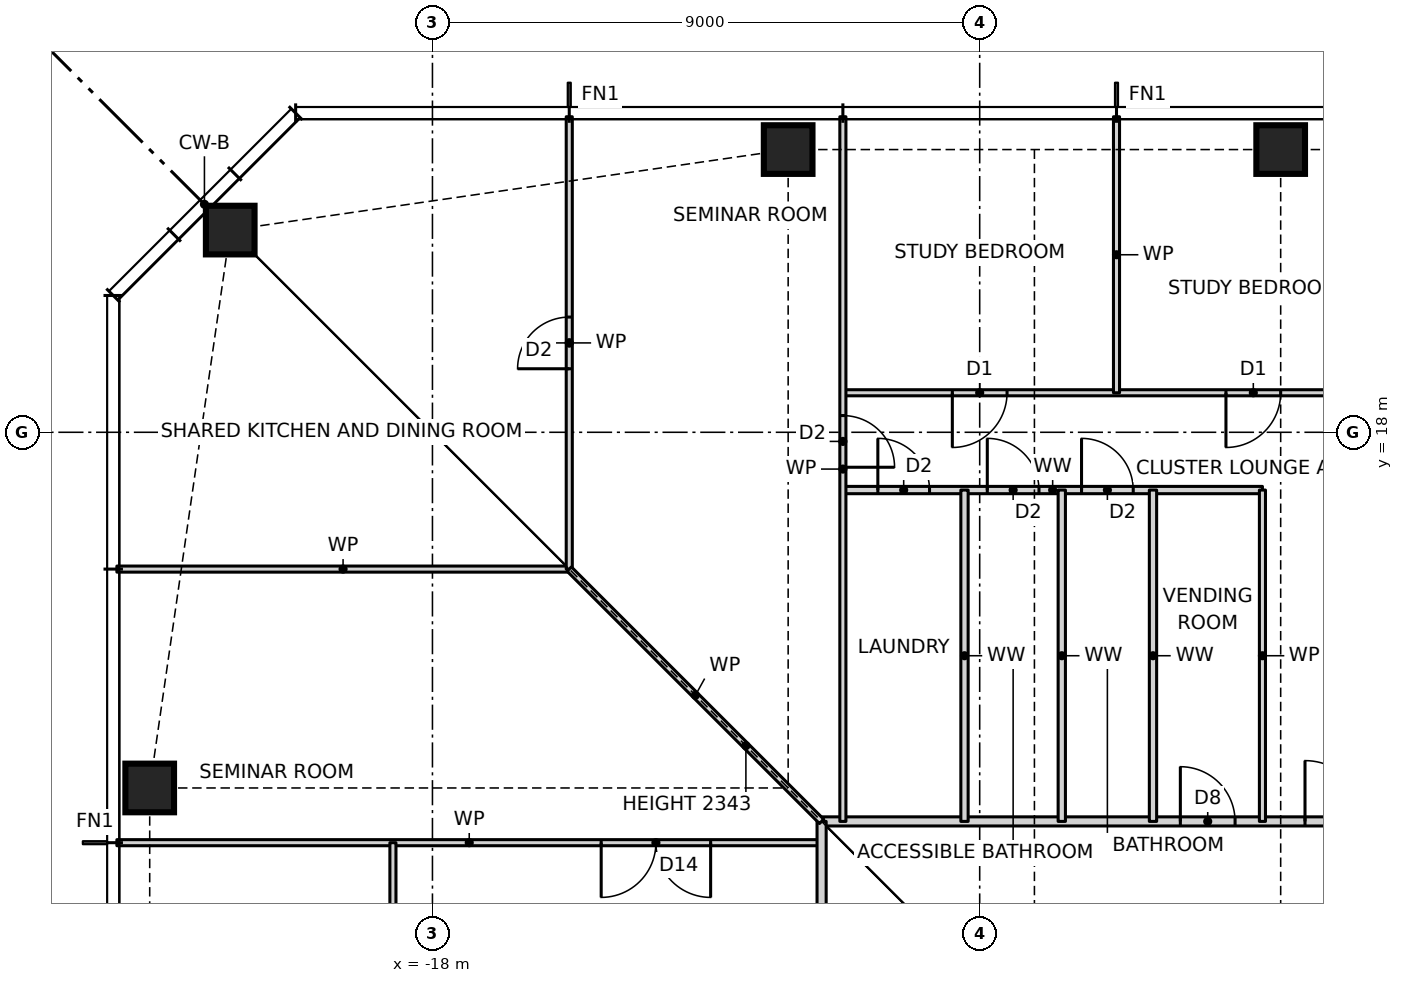
"""IFC4 building model, lengths in metres.
Left out: names, types, materials, properties, quantities, classifications, styles, units other than length and angle.
Written with IfcOpenShell. Run it as: python <this file> out.ifc"""

import sys

from ifc_helpers import new_model, si_unit, direction, frame, frame_2d, origin, origin_2d, place, context, subcontext, project, spatial, rectangle, hollow_rectangle, extrude, element, fill, save


model = new_model("IFC4")
c1 = context("Model", 3, precision=1e-05, world=origin(), true_north=direction((0.0, 1.0)))
c2 = subcontext(c1, "Body", "Model", "MODEL_VIEW")
j1 = project(units=[si_unit("LENGTHUNIT", "METRE"), si_unit("PLANEANGLEUNIT", "RADIAN")], contexts=[c1])
p1 = place(None, origin())
s1 = spatial("IfcSite", under=j1, at=p1, CompositionType="ELEMENT")
p2 = place(p1, origin())
s2 = spatial("IfcBuilding", under=s1, at=p2, CompositionType="ELEMENT")
p3 = place(p2, frame((0.0, 0.0, 67.5)))
s3 = spatial("IfcBuildingStorey", under=s2, at=p3, CompositionType="ELEMENT", Elevation=67.5)
for number, where, z_axis, x_axis in (
    (1, (-4.05, 22.65, 0.0), (0.0, 0.0, 1.0), (1.0, 0.0, 0.0)),
    (2, (-12.15, 22.65, 0.0), (0.0, 0.0, 1.0), (1.0, 0.0, 0.0)),
    (3, (-21.326, 21.326, 0.0), (0.0, 0.0, 1.0), (1.0, 0.0, 0.0)),
    (4, (-22.65, 12.15, 0.0), (0.0, 0.0, 1.0), (1.0, 0.0, 0.0)),
):
    element("IfcColumn", number, at=place(p3, frame(where, z_axis=z_axis, x_axis=x_axis)), inside=s3, PredefinedType="COLUMN", context=c2, shape_type="SweptSolid", body=[
        extrude(hollow_rectangle(XDim=0.8, YDim=0.8, WallThickness=0.09, at=origin_2d()), origin(), (0.0, 0.0, 1.0), 3.5),
    ])
p4 = place(p3, frame((-23.19, 11.25, 0.0), z_axis=(0.0, 0.0, 1.0), x_axis=(1.0, 0.0, 0.0)))
e5 = element("IfcWall", 5, at=p4, inside=s3, PredefinedType="PARTITIONING", context=c2, shape_type="SweptSolid", body=[
    extrude(rectangle(XDim=11.59, YDim=0.1, at=frame_2d((5.795, 0.0))), origin(), (0.0, 0.0, 1.0), 3.27),
])
p5 = place(p4, frame((7.965, 0.0, 0.0)))
e6 = element("IfcOpeningElement", 6, at=p5, cuts=e5, PredefinedType="OPENING", context=c2, shape_type="SweptSolid", body=[
    extrude(rectangle(XDim=1.8, YDim=2.1, at=frame_2d((0.9, 1.05))), frame((0.0, 0.06, 0.0), z_axis=(0.0, -1.0, 0.0), x_axis=(1.0, 0.0, 0.0)), (0.0, 0.0, 1.0), 0.12),
])
p6 = place(p3, frame((-11.6, 11.6, 0.0), z_axis=(0.0, 0.0, 1.0), x_axis=(1.0, 0.0, 0.0)))
e7 = element("IfcWall", 7, at=p6, inside=s3, PredefinedType="PARTITIONING", context=c2, shape_type="SweptSolid", body=[
    extrude(rectangle(XDim=24.2, YDim=0.15, at=frame_2d((12.1, 0.0))), origin(), (0.0, 0.0, 1.0), 3.27),
])
p7 = place(p6, frame((7.95, 0.0, 0.0)))
e8 = element("IfcOpeningElement", 8, at=p7, cuts=e7, PredefinedType="OPENING", context=c2, shape_type="SweptSolid", body=[
    extrude(rectangle(XDim=1.0, YDim=2.1, at=frame_2d((0.5, 1.05))), frame((0.0, 0.085, 0.0), z_axis=(0.0, -1.0, 0.0), x_axis=(1.0, 0.0, 0.0)), (0.0, 0.0, 1.0), 0.17),
])
p8 = place(p6, frame((5.9, 0.0, 0.0)))
e9 = element("IfcOpeningElement", 9, at=p8, cuts=e7, PredefinedType="OPENING", context=c2, shape_type="SweptSolid", body=[
    extrude(rectangle(XDim=0.9, YDim=2.1, at=frame_2d((0.45, 1.05))), frame((0.0, 0.085, 0.0), z_axis=(0.0, -1.0, 0.0), x_axis=(1.0, 0.0, 0.0)), (0.0, 0.0, 1.0), 0.17),
])
p9 = place(p3, frame((-23.19, 15.75, 0.0), z_axis=(0.0, 0.0, 1.0), x_axis=(1.0, 0.0, 0.0)))
e10 = element("IfcWall", 10, at=p9, inside=s3, PredefinedType="PARTITIONING", context=c2, shape_type="SweptSolid", body=[
    extrude(rectangle(XDim=7.44, YDim=0.1, at=frame_2d((3.72, 0.0))), origin(), (0.0, 0.0, 1.0), 3.27),
])
p10 = place(p3, frame((-11.25, 17.05, 0.0), z_axis=(0.0, 0.0, 1.0), x_axis=(1.0, 0.0, 0.0)))
e11 = element("IfcWall", 11, at=p10, inside=s3, PredefinedType="PARTITIONING", context=c2, shape_type="SweptSolid", body=[
    extrude(rectangle(XDim=6.9, YDim=0.12, at=frame_2d((3.45, 0.0))), origin(), (0.0, 0.0, 1.0), 3.27),
])
p11 = place(p10, frame((3.925, 0.0, 0.0)))
e12 = element("IfcOpeningElement", 12, at=p11, cuts=e11, PredefinedType="OPENING", context=c2, shape_type="SweptSolid", body=[
    extrude(rectangle(XDim=0.85, YDim=2.1, at=frame_2d((0.425, 1.05))), frame((0.0, 0.07, 0.0), z_axis=(0.0, -1.0, 0.0), x_axis=(1.0, 0.0, 0.0)), (0.0, 0.0, 1.0), 0.14),
])
p12 = place(p10, frame((2.375, 0.0, 0.0)))
e13 = element("IfcOpeningElement", 13, at=p12, cuts=e11, PredefinedType="OPENING", context=c2, shape_type="SweptSolid", body=[
    extrude(rectangle(XDim=0.85, YDim=2.1, at=frame_2d((0.425, 1.05))), frame((0.0, 0.07, 0.0), z_axis=(0.0, -1.0, 0.0), x_axis=(1.0, 0.0, 0.0)), (0.0, 0.0, 1.0), 0.14),
])
p13 = place(p10, frame((0.575, 0.0, 0.0)))
e14 = element("IfcOpeningElement", 14, at=p13, cuts=e11, PredefinedType="OPENING", context=c2, shape_type="SweptSolid", body=[
    extrude(rectangle(XDim=0.85, YDim=2.1, at=frame_2d((0.425, 1.05))), frame((0.0, 0.07, 0.0), z_axis=(0.0, -1.0, 0.0), x_axis=(1.0, 0.0, 0.0)), (0.0, 0.0, 1.0), 0.14),
])
p14 = place(p3, frame((-11.25, 18.65, 0.0), z_axis=(0.0, 0.0, 1.0), x_axis=(1.0, 0.0, 0.0)))
e15 = element("IfcWall", 15, at=p14, inside=s3, PredefinedType="PARTITIONING", context=c2, shape_type="SweptSolid", body=[
    extrude(rectangle(XDim=27.0, YDim=0.1, at=frame_2d((13.5, 0.0))), origin(), (0.0, 0.0, 1.0), 3.27),
])
p15 = place(p14, frame((24.3, 0.0, 0.0)))
e16 = element("IfcOpeningElement", 16, at=p15, cuts=e15, PredefinedType="OPENING", context=c2, shape_type="SweptSolid", body=[
    extrude(rectangle(XDim=0.9, YDim=2.1, at=frame_2d((0.45, 1.05))), frame((0.0, 0.06, 0.0), z_axis=(0.0, -1.0, 0.0), x_axis=(1.0, 0.0, 0.0)), (0.0, 0.0, 1.0), 0.12),
])
p16 = place(p14, frame((19.8, 0.0, 0.0)))
e17 = element("IfcOpeningElement", 17, at=p16, cuts=e15, PredefinedType="OPENING", context=c2, shape_type="SweptSolid", body=[
    extrude(rectangle(XDim=0.9, YDim=2.1, at=frame_2d((0.45, 1.05))), frame((0.0, 0.06, 0.0), z_axis=(0.0, -1.0, 0.0), x_axis=(1.0, 0.0, 0.0)), (0.0, 0.0, 1.0), 0.12),
])
p17 = place(p14, frame((15.3, 0.0, 0.0)))
e18 = element("IfcOpeningElement", 18, at=p17, cuts=e15, PredefinedType="OPENING", context=c2, shape_type="SweptSolid", body=[
    extrude(rectangle(XDim=0.9, YDim=2.1, at=frame_2d((0.45, 1.05))), frame((0.0, 0.06, 0.0), z_axis=(0.0, -1.0, 0.0), x_axis=(1.0, 0.0, 0.0)), (0.0, 0.0, 1.0), 0.12),
])
p18 = place(p14, frame((10.8, 0.0, 0.0)))
e19 = element("IfcOpeningElement", 19, at=p18, cuts=e15, PredefinedType="OPENING", context=c2, shape_type="SweptSolid", body=[
    extrude(rectangle(XDim=0.9, YDim=2.1, at=frame_2d((0.45, 1.05))), frame((0.0, 0.06, 0.0), z_axis=(0.0, -1.0, 0.0), x_axis=(1.0, 0.0, 0.0)), (0.0, 0.0, 1.0), 0.12),
])
p19 = place(p14, frame((6.3, 0.0, 0.0)))
e20 = element("IfcOpeningElement", 20, at=p19, cuts=e15, PredefinedType="OPENING", context=c2, shape_type="SweptSolid", body=[
    extrude(rectangle(XDim=0.9, YDim=2.1, at=frame_2d((0.45, 1.05))), frame((0.0, 0.06, 0.0), z_axis=(0.0, -1.0, 0.0), x_axis=(1.0, 0.0, 0.0)), (0.0, 0.0, 1.0), 0.12),
])
p20 = place(p14, frame((1.8, 0.0, 0.0)))
e21 = element("IfcOpeningElement", 21, at=p20, cuts=e15, PredefinedType="OPENING", context=c2, shape_type="SweptSolid", body=[
    extrude(rectangle(XDim=0.9, YDim=2.1, at=frame_2d((0.45, 1.05))), frame((0.0, 0.06, 0.0), z_axis=(0.0, -1.0, 0.0), x_axis=(1.0, 0.0, 0.0)), (0.0, 0.0, 1.0), 0.12),
])
p21 = place(p3, frame((-4.35, 11.6, 0.0), z_axis=(0.0, 0.0, 1.0), x_axis=(0.0, 1.0, 0.0)))
e22 = element("IfcWall", 22, at=p21, inside=s3, PredefinedType="PARTITIONING", context=c2, shape_type="SweptSolid", body=[
    extrude(rectangle(XDim=5.45, YDim=0.1, at=frame_2d((2.725, 0.0))), origin(), (0.0, 0.0, 1.0), 3.27),
])
p22 = place(p3, frame((-6.15, 11.6, 0.0), z_axis=(0.0, 0.0, 1.0), x_axis=(0.0, 1.0, 0.0)))
e23 = element("IfcWall", 23, at=p22, inside=s3, PredefinedType="PARTITIONING", context=c2, shape_type="SweptSolid", body=[
    extrude(rectangle(XDim=5.45, YDim=0.12, at=frame_2d((2.725, 0.0))), origin(), (0.0, 0.0, 1.0), 3.27),
])
p23 = place(p3, frame((-6.75, 18.65, 0.0), z_axis=(0.0, 0.0, 1.0), x_axis=(0.0, 1.0, 0.0)))
e24 = element("IfcWall", 24, at=p23, inside=s3, PredefinedType="PARTITIONING", context=c2, shape_type="SweptSolid", body=[
    extrude(rectangle(XDim=4.54, YDim=0.1, at=frame_2d((2.27, 0.0))), origin(), (0.0, 0.0, 1.0), 3.27),
])
for number, where, z_axis, x_axis in (
    (25, (-7.65, 11.6, 0.0), (0.0, 0.0, 1.0), (0.0, 1.0, 0.0)),
    (26, (-9.25, 11.6, 0.0), (0.0, 0.0, 1.0), (0.0, 1.0, 0.0)),
):
    element("IfcWall", number, at=place(p3, frame(where, z_axis=z_axis, x_axis=x_axis)), inside=s3, PredefinedType="PARTITIONING", context=c2, shape_type="SweptSolid", body=[
        extrude(rectangle(XDim=5.45, YDim=0.12, at=frame_2d((2.725, 0.0))), origin(), (0.0, 0.0, 1.0), 3.27),
    ])
p24 = place(p3, frame((-11.25, 11.6, 0.0), z_axis=(0.0, 0.0, 1.0), x_axis=(0.0, 1.0, 0.0)))
e27 = element("IfcWall", 27, at=p24, inside=s3, PredefinedType="PARTITIONING", context=c2, shape_type="SweptSolid", body=[
    extrude(rectangle(XDim=11.59, YDim=0.1, at=frame_2d((5.795, 0.0))), origin(), (0.0, 0.0, 1.0), 3.27),
])
p25 = place(p24, frame((5.825, 0.0, 0.0)))
e28 = element("IfcOpeningElement", 28, at=p25, cuts=e27, PredefinedType="OPENING", context=c2, shape_type="SweptSolid", body=[
    extrude(rectangle(XDim=0.85, YDim=2.1, at=frame_2d((0.425, 1.05))), frame((0.0, 0.06, 0.0), z_axis=(0.0, -1.0, 0.0), x_axis=(1.0, 0.0, 0.0)), (0.0, 0.0, 1.0), 0.12),
])
p26 = place(p3, frame((-11.6, -11.6, 0.0), z_axis=(0.0, 0.0, 1.0), x_axis=(0.0, 1.0, 0.0)))
e29 = element("IfcWall", 29, at=p26, inside=s3, PredefinedType="PARTITIONING", context=c2, shape_type="SweptSolid", body=[
    extrude(rectangle(XDim=23.2, YDim=0.15, at=frame_2d((11.6, 0.0))), origin(), (0.0, 0.0, 1.0), 3.27),
])
p27 = place(p26, frame((18.6, 0.0, 0.0)))
e30 = element("IfcOpeningElement", 30, at=p27, cuts=e29, PredefinedType="OPENING", context=c2, shape_type="SweptSolid", body=[
    extrude(rectangle(XDim=1.0, YDim=2.1, at=frame_2d((0.5, 1.05))), frame((0.0, 0.085, 0.0), z_axis=(0.0, -1.0, 0.0), x_axis=(1.0, 0.0, 0.0)), (0.0, 0.0, 1.0), 0.17),
])
p28 = place(p26, frame((1.175, 0.0, 0.0)))
e31 = element("IfcOpeningElement", 31, at=p28, cuts=e29, PredefinedType="OPENING", context=c2, shape_type="SweptSolid", body=[
    extrude(rectangle(XDim=1.0, YDim=2.1, at=frame_2d((0.5, 1.05))), frame((0.0, 0.085, 0.0), z_axis=(0.0, -1.0, 0.0), x_axis=(1.0, 0.0, 0.0)), (0.0, 0.0, 1.0), 0.17),
])
p29 = place(p3, frame((-15.75, 15.75, 0.0), z_axis=(0.0, 0.0, 1.0), x_axis=(0.0, 1.0, 0.0)))
e32 = element("IfcWall", 32, at=p29, inside=s3, PredefinedType="PARTITIONING", context=c2, shape_type="SweptSolid", body=[
    extrude(rectangle(XDim=7.44, YDim=0.1, at=frame_2d((3.72, 0.0))), origin(), (0.0, 0.0, 1.0), 3.27),
])
p30 = place(p29, frame((3.295, 0.0, 0.0)))
e33 = element("IfcOpeningElement", 33, at=p30, cuts=e32, PredefinedType="OPENING", context=c2, shape_type="SweptSolid", body=[
    extrude(rectangle(XDim=0.85, YDim=2.1, at=frame_2d((0.425, 1.05))), frame((0.0, 0.06, 0.0), z_axis=(0.0, -1.0, 0.0), x_axis=(1.0, 0.0, 0.0)), (0.0, 0.0, 1.0), 0.12),
])
p31 = place(p3, frame((-18.65, -15.75, 0.0), z_axis=(0.0, 0.0, 1.0), x_axis=(0.0, 1.0, 0.0)))
e34 = element("IfcWall", 34, at=p31, inside=s3, PredefinedType="PARTITIONING", context=c2, shape_type="SweptSolid", body=[
    extrude(rectangle(XDim=27.0, YDim=0.1, at=frame_2d((13.5, 0.0))), origin(), (0.0, 0.0, 1.0), 3.0),
])
p32 = place(p31, frame((24.3, 0.0, 0.0)))
e35 = element("IfcOpeningElement", 35, at=p32, cuts=e34, PredefinedType="OPENING", context=c2, shape_type="SweptSolid", body=[
    extrude(rectangle(XDim=0.9, YDim=2.1, at=frame_2d((0.45, 1.05))), frame((0.0, 0.06, 0.0), z_axis=(0.0, -1.0, 0.0), x_axis=(1.0, 0.0, 0.0)), (0.0, 0.0, 1.0), 0.12),
])
p33 = place(p31, frame((19.8, 0.0, 0.0)))
e36 = element("IfcOpeningElement", 36, at=p33, cuts=e34, PredefinedType="OPENING", context=c2, shape_type="SweptSolid", body=[
    extrude(rectangle(XDim=0.9, YDim=2.1, at=frame_2d((0.45, 1.05))), frame((0.0, 0.06, 0.0), z_axis=(0.0, -1.0, 0.0), x_axis=(1.0, 0.0, 0.0)), (0.0, 0.0, 1.0), 0.12),
])
p34 = place(p31, frame((15.3, 0.0, 0.0)))
e37 = element("IfcOpeningElement", 37, at=p34, cuts=e34, PredefinedType="OPENING", context=c2, shape_type="SweptSolid", body=[
    extrude(rectangle(XDim=0.9, YDim=2.1, at=frame_2d((0.45, 1.05))), frame((0.0, 0.06, 0.0), z_axis=(0.0, -1.0, 0.0), x_axis=(1.0, 0.0, 0.0)), (0.0, 0.0, 1.0), 0.12),
])
p35 = place(p31, frame((10.8, 0.0, 0.0)))
e38 = element("IfcOpeningElement", 38, at=p35, cuts=e34, PredefinedType="OPENING", context=c2, shape_type="SweptSolid", body=[
    extrude(rectangle(XDim=0.9, YDim=2.1, at=frame_2d((0.45, 1.05))), frame((0.0, 0.06, 0.0), z_axis=(0.0, -1.0, 0.0), x_axis=(1.0, 0.0, 0.0)), (0.0, 0.0, 1.0), 0.12),
])
p36 = place(p31, frame((6.3, 0.0, 0.0)))
e39 = element("IfcOpeningElement", 39, at=p36, cuts=e34, PredefinedType="OPENING", context=c2, shape_type="SweptSolid", body=[
    extrude(rectangle(XDim=0.9, YDim=2.1, at=frame_2d((0.45, 1.05))), frame((0.0, 0.06, 0.0), z_axis=(0.0, -1.0, 0.0), x_axis=(1.0, 0.0, 0.0)), (0.0, 0.0, 1.0), 0.12),
])
p37 = place(p31, frame((1.8, 0.0, 0.0)))
e40 = element("IfcOpeningElement", 40, at=p37, cuts=e34, PredefinedType="OPENING", context=c2, shape_type="SweptSolid", body=[
    extrude(rectangle(XDim=0.9, YDim=2.1, at=frame_2d((0.45, 1.05))), frame((0.0, 0.06, 0.0), z_axis=(0.0, -1.0, 0.0), x_axis=(1.0, 0.0, 0.0)), (0.0, 0.0, 1.0), 0.12),
])
p38 = place(p3, frame((-11.6, 11.6, 0.0), z_axis=(0.0, 0.0, 1.0), x_axis=(-0.707106781187, 0.707106781187, 0.0)))
e41 = element("IfcWall", 41, at=p38, inside=s3, PredefinedType="PARTITIONING", context=c2, shape_type="SweptSolid", body=[
    extrude(rectangle(XDim=5.869, YDim=0.1, at=frame_2d((2.935, 0.0))), origin(), (0.0, 0.0, 1.0), 2.343),
])
p39 = place(p19, frame((0.9, 0.0, 0.0), z_axis=(0.0, 0.0, 1.0), x_axis=(-1.0, 0.0, 0.0)))
e42 = element("IfcDoor", 42, at=p39, inside=s3, OperationType="SINGLE_SWING_RIGHT", PredefinedType="DOOR", context=c2, shape_type="SweptSolid", body=[
    extrude(rectangle(XDim=0.9, YDim=2.1, at=frame_2d((0.45, 1.05))), frame((0.0, 0.025, 0.0), z_axis=(0.0, -1.0, 0.0), x_axis=(1.0, 0.0, 0.0)), (0.0, 0.0, 1.0), 0.05),
])
fill(e20, e42)
p40 = place(p20, frame((0.9, 0.0, 0.0), z_axis=(0.0, 0.0, 1.0), x_axis=(-1.0, 0.0, 0.0)))
e43 = element("IfcDoor", 43, at=p40, inside=s3, OperationType="SINGLE_SWING_RIGHT", PredefinedType="DOOR", context=c2, shape_type="SweptSolid", body=[
    extrude(rectangle(XDim=0.9, YDim=2.1, at=frame_2d((0.45, 1.05))), frame((0.0, 0.025, 0.0), z_axis=(0.0, -1.0, 0.0), x_axis=(1.0, 0.0, 0.0)), (0.0, 0.0, 1.0), 0.05),
])
fill(e21, e43)
p41 = place(p7, origin())
e44 = element("IfcDoor", 44, at=p41, inside=s3, OperationType="SINGLE_SWING_LEFT", PredefinedType="DOOR", context=c2, shape_type="SweptSolid", body=[
    extrude(rectangle(XDim=1.0, YDim=2.1, at=frame_2d((0.5, 1.05))), frame((0.0, 0.025, 0.0), z_axis=(0.0, -1.0, 0.0), x_axis=(1.0, 0.0, 0.0)), (0.0, 0.0, 1.0), 0.05),
])
fill(e8, e44)
p42 = place(p8, origin())
e45 = element("IfcDoor", 45, at=p42, inside=s3, OperationType="SINGLE_SWING_LEFT", PredefinedType="DOOR", context=c2, shape_type="SweptSolid", body=[
    extrude(rectangle(XDim=0.9, YDim=2.1, at=frame_2d((0.45, 1.05))), frame((0.0, 0.025, 0.0), z_axis=(0.0, -1.0, 0.0), x_axis=(1.0, 0.0, 0.0)), (0.0, 0.0, 1.0), 0.05),
])
fill(e9, e45)
p43 = place(p11, origin())
e46 = element("IfcDoor", 46, at=p43, inside=s3, OperationType="SINGLE_SWING_LEFT", PredefinedType="DOOR", context=c2, shape_type="SweptSolid", body=[
    extrude(rectangle(XDim=0.85, YDim=2.1, at=frame_2d((0.425, 1.05))), frame((0.0, 0.025, 0.0), z_axis=(0.0, -1.0, 0.0), x_axis=(1.0, 0.0, 0.0)), (0.0, 0.0, 1.0), 0.05),
])
fill(e12, e46)
p44 = place(p12, origin())
e47 = element("IfcDoor", 47, at=p44, inside=s3, OperationType="SINGLE_SWING_LEFT", PredefinedType="DOOR", context=c2, shape_type="SweptSolid", body=[
    extrude(rectangle(XDim=0.85, YDim=2.1, at=frame_2d((0.425, 1.05))), frame((0.0, 0.025, 0.0), z_axis=(0.0, -1.0, 0.0), x_axis=(1.0, 0.0, 0.0)), (0.0, 0.0, 1.0), 0.05),
])
fill(e13, e47)
p45 = place(p13, origin())
e48 = element("IfcDoor", 48, at=p45, inside=s3, OperationType="SINGLE_SWING_LEFT", PredefinedType="DOOR", context=c2, shape_type="SweptSolid", body=[
    extrude(rectangle(XDim=0.85, YDim=2.1, at=frame_2d((0.425, 1.05))), frame((0.0, 0.025, 0.0), z_axis=(0.0, -1.0, 0.0), x_axis=(1.0, 0.0, 0.0)), (0.0, 0.0, 1.0), 0.05),
])
fill(e14, e48)
p46 = place(p25, frame((0.85, 0.0, 0.0), z_axis=(0.0, 0.0, 1.0), x_axis=(-1.0, 0.0, 0.0)))
e49 = element("IfcDoor", 49, at=p46, inside=s3, OperationType="SINGLE_SWING_RIGHT", PredefinedType="DOOR", context=c2, shape_type="SweptSolid", body=[
    extrude(rectangle(XDim=0.85, YDim=2.1, at=frame_2d((0.425, 1.05))), frame((0.0, 0.025, 0.0), z_axis=(0.0, -1.0, 0.0), x_axis=(1.0, 0.0, 0.0)), (0.0, 0.0, 1.0), 0.05),
])
fill(e28, e49)
p47 = place(p5, frame((1.8, 0.0, 0.0), z_axis=(0.0, 0.0, 1.0), x_axis=(-1.0, 0.0, 0.0)))
e50 = element("IfcDoor", 50, at=p47, inside=s3, OperationType="DOUBLE_DOOR_SINGLE_SWING", PredefinedType="DOOR", context=c2, shape_type="SweptSolid", body=[
    extrude(rectangle(XDim=1.8, YDim=2.1, at=frame_2d((0.9, 1.05))), frame((0.0, 0.025, 0.0), z_axis=(0.0, -1.0, 0.0), x_axis=(1.0, 0.0, 0.0)), (0.0, 0.0, 1.0), 0.05),
])
fill(e6, e50)
p48 = place(p30, origin())
e51 = element("IfcDoor", 51, at=p48, inside=s3, OperationType="SINGLE_SWING_LEFT", PredefinedType="DOOR", context=c2, shape_type="SweptSolid", body=[
    extrude(rectangle(XDim=0.85, YDim=2.1, at=frame_2d((0.425, 1.05))), frame((0.0, 0.025, 0.0), z_axis=(0.0, -1.0, 0.0), x_axis=(1.0, 0.0, 0.0)), (0.0, 0.0, 1.0), 0.05),
])
fill(e33, e51)
save(model, sys.argv[1])
